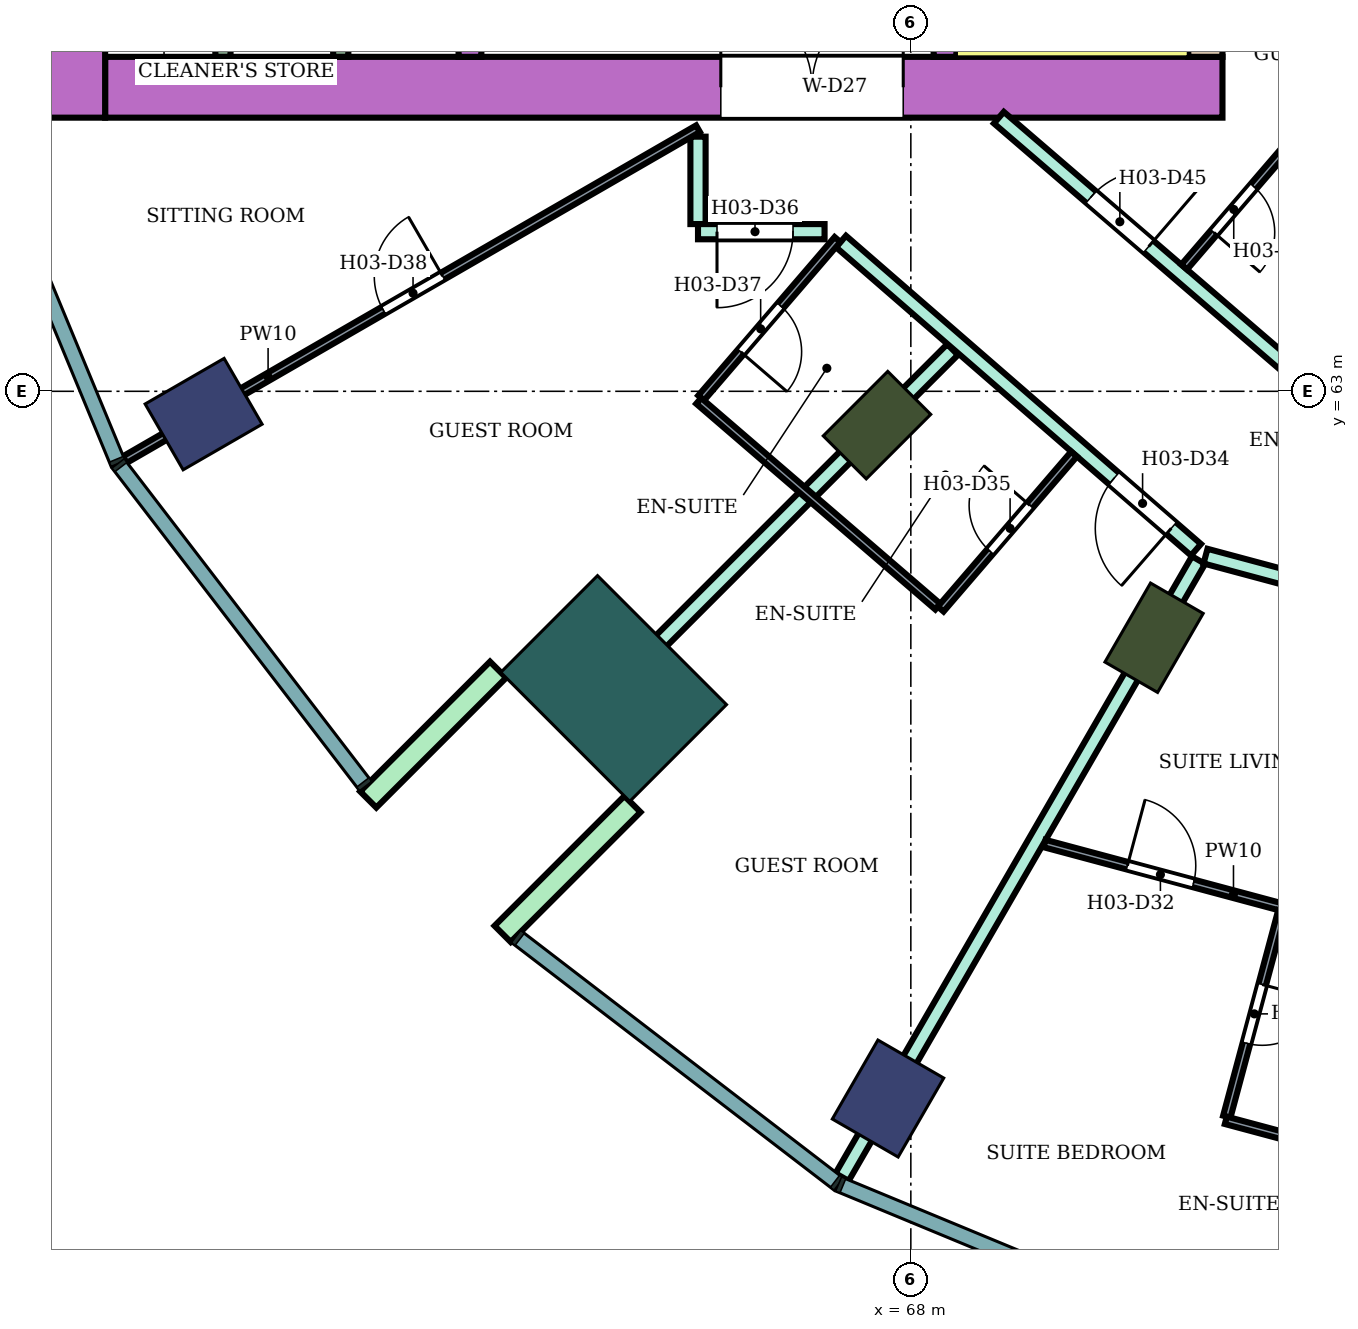
"""IFC4 building model, lengths in metres.
Left out: names, types, materials, properties, quantities, classifications, styles, units other than length and angle.
Written with IfcOpenShell. Run it as: python <this file> out.ifc"""

import sys

from ifc_helpers import new_model, si_unit, direction, frame, frame_2d, origin, origin_2d, place, context, subcontext, project, spatial, rectangle, extrude, element, fill, save


model = new_model("IFC4")
c1 = context("Model", 3, precision=1e-05, world=origin(), true_north=direction((0.0, 1.0)))
c2 = subcontext(c1, "Body", "Model", "MODEL_VIEW")
j1 = project(units=[si_unit("LENGTHUNIT", "METRE"), si_unit("PLANEANGLEUNIT", "RADIAN")], contexts=[c1])
p1 = place(None, origin())
s1 = spatial("IfcSite", under=j1, at=p1, CompositionType="ELEMENT")
p2 = place(p1, origin())
s2 = spatial("IfcBuilding", under=s1, at=p2, CompositionType="ELEMENT")
p3 = place(p2, frame((0.0, 0.0, 51.6)))
s3 = spatial("IfcBuildingStorey", under=s2, at=p3, CompositionType="ELEMENT", Elevation=51.6)
for number, where, z_axis, x_axis in (
    (1, (58.696, 62.7, 0.0), (0.0, 0.0, 1.0), (-0.866, -0.5, 0.0)),
    (2, (67.7, 53.696, 0.0), (0.0, 0.0, 1.0), (-0.5, -0.866, 0.0)),
):
    element("IfcColumn", number, at=place(p3, frame(where, z_axis=z_axis, x_axis=x_axis)), inside=s3, PredefinedType="COLUMN", context=c2, shape_type="SweptSolid", body=[
        extrude(rectangle(XDim=1.2, YDim=1.0, at=origin_2d()), origin(), (0.0, 0.0, 1.0), 3.8),
    ])
for number, where, z_axis, x_axis in (
    (3, (67.555, 62.555, 0.0), (0.0, 0.0, 1.0), (-0.707, -0.707, 0.0)),
    (4, (71.2, 59.758, 0.0), (0.0, 0.0, 1.0), (-0.5, -0.866, 0.0)),
):
    element("IfcColumn", number, at=place(p3, frame(where, z_axis=z_axis, x_axis=x_axis)), inside=s3, PredefinedType="COLUMN", context=c2, shape_type="SweptSolid", body=[
        extrude(rectangle(XDim=1.2, YDim=0.8, at=origin_2d()), origin(), (0.0, 0.0, 1.0), 3.8),
    ])
p4 = place(p3, frame((64.09, 59.09, 0.0), z_axis=(0.0, 0.0, 1.0), x_axis=(-0.707106781187, -0.707106781187, 0.0)))
e5 = element("IfcColumn", 5, at=p4, inside=s3, PredefinedType="COLUMN", context=c2, shape_type="SweptSolid", body=[
    extrude(rectangle(XDim=1.8, YDim=2.4, at=origin_2d()), origin(), (0.0, 0.0, 1.0), 3.8),
])
p5 = place(p3, frame((72.1, 67.0, 0.0), z_axis=(0.0, 0.0, 1.0), x_axis=(-1.0, 0.0, 0.0)))
e6 = element("IfcWall", 6, at=p5, inside=s3, PredefinedType="SHEAR", context=c2, shape_type="SweptSolid", body=[
    extrude(rectangle(XDim=14.7, YDim=0.8, at=frame_2d((7.35, 0.0))), origin(), (0.0, 0.0, 1.0), 3.48),
])
p6 = place(p5, frame((4.2, 0.0, 0.0)))
e7 = element("IfcOpeningElement", 7, at=p6, cuts=e6, PredefinedType="OPENING", context=c2, shape_type="SweptSolid", body=[
    extrude(rectangle(XDim=2.4, YDim=2.4, at=frame_2d((1.2, 1.2))), frame((0.0, 0.41, 0.0), z_axis=(0.0, -1.0, 0.0), x_axis=(1.0, 0.0, 0.0)), (0.0, 0.0, 1.0), 0.82),
])
p7 = place(p3, frame((71.875, 75.0, 0.0), z_axis=(0.0, 0.0, 1.0), x_axis=(0.0, -1.0, 0.0)))
e8 = element("IfcWall", 8, at=p7, inside=s3, PredefinedType="SHEAR", context=c2, shape_type="SweptSolid", body=[
    extrude(rectangle(XDim=7.6, YDim=0.45, at=frame_2d((3.8, 0.0))), origin(), (0.0, 0.0, 1.0), 3.48),
])
p8 = place(p3, frame((57.0, 83.4, 0.0), z_axis=(0.0, 0.0, 1.0), x_axis=(0.0, -1.0, 0.0)))
e9 = element("IfcWall", 9, at=p8, inside=s3, PredefinedType="SHEAR", context=c2, shape_type="SweptSolid", body=[
    extrude(rectangle(XDim=16.8, YDim=0.8, at=frame_2d((8.4, 0.0))), origin(), (0.0, 0.0, 1.0), 3.48),
])
p9 = place(p3, frame((68.45, 75.0, 0.0), z_axis=(0.0, 0.0, 1.0), x_axis=(0.0, -1.0, 0.0)))
e10 = element("IfcWall", 10, at=p9, inside=s3, PredefinedType="SHEAR", context=c2, shape_type="SweptSolid", body=[
    extrude(rectangle(XDim=7.6, YDim=0.3, at=frame_2d((3.8, 0.0))), origin(), (0.0, 0.0, 1.0), 3.48),
])
p10 = place(p9, frame((1.85, 0.0, 0.0)))
e11 = element("IfcOpeningElement", 11, at=p10, cuts=e10, PredefinedType="OPENING", context=c2, shape_type="SweptSolid", body=[
    extrude(rectangle(XDim=0.9, YDim=2.1, at=frame_2d((0.45, 1.05))), frame((0.0, 0.16, 0.0), z_axis=(0.0, -1.0, 0.0), x_axis=(1.0, 0.0, 0.0)), (0.0, 0.0, 1.0), 0.32),
])
p11 = place(p3, frame((62.2, 70.45, 0.0), z_axis=(0.0, 0.0, 1.0), x_axis=(0.0, -1.0, 0.0)))
e12 = element("IfcWall", 12, at=p11, inside=s3, PredefinedType="SHEAR", context=c2, shape_type="SweptSolid", body=[
    extrude(rectangle(XDim=3.05, YDim=0.3, at=frame_2d((1.525, 0.0))), origin(), (0.0, 0.0, 1.0), 3.48),
])
for number, where, z_axis, x_axis in (
    (13, (62.57, 59.338, 0.0), (0.0, 0.0, 1.0), (-0.707, -0.707, 0.0)),
    (14, (64.338, 57.57, 0.0), (0.0, 0.0, 1.0), (-0.707, -0.707, 0.0)),
):
    element("IfcWall", number, at=place(p3, frame(where, z_axis=z_axis, x_axis=x_axis)), inside=s3, PredefinedType="NOTDEFINED", context=c2, shape_type="SweptSolid", body=[
        extrude(rectangle(XDim=2.416, YDim=0.3, at=frame_2d((1.208, 0.0))), origin(), (0.0, 0.0, 1.0), 3.8),
    ])
p12 = place(p3, frame((63.596, 58.596, 0.0), z_axis=(0.0, 0.0, 1.0), x_axis=(0.707106781187, 0.707106781187, 0.0)))
e15 = element("IfcWall", 15, at=p12, inside=s3, PredefinedType="PARTITIONING", context=c2, shape_type="SweptSolid", body=[
    extrude(rectangle(XDim=7.005, YDim=0.2, at=frame_2d((3.503, 0.0))), origin(), (0.0, 0.0, 1.0), 3.35),
])
p13 = place(p3, frame((65.2, 65.2, 0.0), z_axis=(0.0, 0.0, 1.0), x_axis=(0.0, 1.0, 0.0)))
e16 = element("IfcWall", 16, at=p13, inside=s3, PredefinedType="PARTITIONING", context=c2, shape_type="SweptSolid", body=[
    extrude(rectangle(XDim=1.15, YDim=0.2, at=frame_2d((0.575, 0.0))), origin(), (0.0, 0.0, 1.0), 3.35),
])
p14 = place(p3, frame((65.2, 65.1, 0.0), z_axis=(0.0, 0.0, 1.0), x_axis=(1.0, 0.0, 0.0)))
e17 = element("IfcWall", 17, at=p14, inside=s3, PredefinedType="PARTITIONING", context=c2, shape_type="SweptSolid", body=[
    extrude(rectangle(XDim=1.665, YDim=0.2, at=frame_2d((0.833, 0.0))), origin(), (0.0, 0.0, 1.0), 3.35),
])
p15 = place(p14, frame((0.25, 0.0, 0.0)))
e18 = element("IfcOpeningElement", 18, at=p15, cuts=e17, PredefinedType="OPENING", context=c2, shape_type="SweptSolid", body=[
    extrude(rectangle(XDim=1.0, YDim=2.1, at=frame_2d((0.5, 1.05))), frame((0.0, 0.11, 0.0), z_axis=(0.0, -1.0, 0.0), x_axis=(1.0, 0.0, 0.0)), (0.0, 0.0, 1.0), 0.22),
])
p16 = place(p3, frame((67.081, 64.971, 0.0), z_axis=(0.0, 0.0, 1.0), x_axis=(0.755031061605, -0.65568902386, 0.0)))
e19 = element("IfcWall", 19, at=p16, inside=s3, PredefinedType="PARTITIONING", context=c2, shape_type="SweptSolid", body=[
    extrude(rectangle(XDim=6.186, YDim=0.2, at=frame_2d((3.093, 0.0))), origin(), (0.0, 0.0, 1.0), 3.35),
])
p17 = place(p16, frame((4.755, 0.0, 0.0)))
e20 = element("IfcOpeningElement", 20, at=p17, cuts=e19, PredefinedType="OPENING", context=c2, shape_type="SweptSolid", body=[
    extrude(rectangle(XDim=1.0, YDim=2.1, at=frame_2d((0.5, 1.05))), frame((0.0, 0.11, 0.0), z_axis=(0.0, -1.0, 0.0), x_axis=(1.0, 0.0, 0.0)), (0.0, 0.0, 1.0), 0.22),
])
p18 = place(p3, frame((67.095, 52.662, 0.0), z_axis=(0.0, 0.0, 1.0), x_axis=(0.500247659952, 0.865882370021, 0.0)))
e21 = element("IfcWall", 21, at=p18, inside=s3, PredefinedType="PARTITIONING", context=c2, shape_type="SweptSolid", body=[
    extrude(rectangle(XDim=9.375, YDim=0.2, at=frame_2d((4.688, 0.0))), origin(), (0.0, 0.0, 1.0), 3.35),
])
p19 = place(p3, frame((69.158, 66.6, 0.0), z_axis=(0.0, 0.0, 1.0), x_axis=(0.757976058094, -0.652282373943, 0.0)))
e22 = element("IfcWall", 22, at=p19, inside=s3, PredefinedType="PARTITIONING", context=c2, shape_type="SweptSolid", body=[
    extrude(rectangle(XDim=5.16, YDim=0.2, at=frame_2d((2.58, 0.0))), origin(), (0.0, 0.0, 1.0), 3.35),
])
p20 = place(p19, frame((1.6, 0.0, 0.0)))
e23 = element("IfcOpeningElement", 23, at=p20, cuts=e22, PredefinedType="OPENING", context=c2, shape_type="SweptSolid", body=[
    extrude(rectangle(XDim=1.0, YDim=2.1, at=frame_2d((0.5, 1.05))), frame((0.0, 0.11, 0.0), z_axis=(0.0, -1.0, 0.0), x_axis=(1.0, 0.0, 0.0)), (0.0, 0.0, 1.0), 0.22),
])
p21 = place(p3, frame((71.877, 60.831, 0.0), z_axis=(0.0, 0.0, 1.0), x_axis=(0.965852509869, -0.259092510851, 0.0)))
e24 = element("IfcWall", 24, at=p21, inside=s3, PredefinedType="PARTITIONING", context=c2, shape_type="SweptSolid", body=[
    extrude(rectangle(XDim=8.32, YDim=0.2, at=frame_2d((4.16, 0.0))), origin(), (0.0, 0.0, 1.0), 3.35),
])
p22 = place(p21, frame((6.86, 0.0, 0.0)))
e25 = element("IfcOpeningElement", 25, at=p22, cuts=e24, PredefinedType="OPENING", context=c2, shape_type="SweptSolid", body=[
    extrude(rectangle(XDim=1.0, YDim=2.1, at=frame_2d((0.5, 1.05))), frame((0.0, 0.11, 0.0), z_axis=(0.0, -1.0, 0.0), x_axis=(1.0, 0.0, 0.0)), (0.0, 0.0, 1.0), 0.22),
])
p23 = place(p21, frame((1.6, 0.0, 0.0)))
e26 = element("IfcOpeningElement", 26, at=p23, cuts=e24, PredefinedType="OPENING", context=c2, shape_type="SweptSolid", body=[
    extrude(rectangle(XDim=1.0, YDim=2.1, at=frame_2d((0.5, 1.05))), frame((0.0, 0.11, 0.0), z_axis=(0.0, -1.0, 0.0), x_axis=(1.0, 0.0, 0.0)), (0.0, 0.0, 1.0), 0.22),
])
p24 = place(p3, frame((57.659, 62.101, 0.0), z_axis=(0.0, 0.0, 1.0), x_axis=(0.86602264145, 0.500004784474, 0.0)))
e27 = element("IfcWall", 27, at=p24, inside=s3, PredefinedType="PARTITIONING", context=c2, shape_type="SweptSolid", body=[
    extrude(rectangle(XDim=8.708, YDim=0.1, at=frame_2d((4.354, 0.0))), origin(), (0.0, 0.0, 1.0), 3.35),
])
p25 = place(p24, frame((3.929, 0.0, 0.0)))
e28 = element("IfcOpeningElement", 28, at=p25, cuts=e27, PredefinedType="OPENING", context=c2, shape_type="SweptSolid", body=[
    extrude(rectangle(XDim=0.9, YDim=2.1, at=frame_2d((0.45, 1.05))), frame((0.0, 0.06, 0.0), z_axis=(0.0, -1.0, 0.0), x_axis=(1.0, 0.0, 0.0)), (0.0, 0.0, 1.0), 0.12),
])
p26 = place(p3, frame((65.242, 62.912, 0.0), z_axis=(0.0, 0.0, 1.0), x_axis=(0.652069888227, 0.758158862553, 0.0)))
e29 = element("IfcWall", 29, at=p26, inside=s3, PredefinedType="PARTITIONING", context=c2, shape_type="SweptSolid", body=[
    extrude(rectangle(XDim=2.75, YDim=0.1, at=frame_2d((1.375, 0.0))), origin(), (0.0, 0.0, 1.0), 3.35),
])
p27 = place(p26, frame((0.8, 0.0, 0.0)))
e30 = element("IfcOpeningElement", 30, at=p27, cuts=e29, PredefinedType="OPENING", context=c2, shape_type="SweptSolid", body=[
    extrude(rectangle(XDim=0.8, YDim=2.1, at=frame_2d((0.4, 1.05))), frame((0.0, 0.06, 0.0), z_axis=(0.0, -1.0, 0.0), x_axis=(1.0, 0.0, 0.0)), (0.0, 0.0, 1.0), 0.12),
])
p28 = place(p3, frame((65.209, 62.875, 0.0), z_axis=(0.0, 0.0, 1.0), x_axis=(0.757930378138, -0.652335451969, 0.0)))
e31 = element("IfcWall", 31, at=p28, inside=s3, PredefinedType="PARTITIONING", context=c2, shape_type="SweptSolid", body=[
    extrude(rectangle(XDim=4.15, YDim=0.1, at=frame_2d((2.075, 0.0))), origin(), (0.0, 0.0, 1.0), 3.35),
])
p29 = place(p3, frame((68.393, 60.135, 0.0), z_axis=(0.0, 0.0, 1.0), x_axis=(0.652061182569, 0.758166349944, 0.0)))
e32 = element("IfcWall", 32, at=p29, inside=s3, PredefinedType="PARTITIONING", context=c2, shape_type="SweptSolid", body=[
    extrude(rectangle(XDim=2.69, YDim=0.1, at=frame_2d((1.345, 0.0))), origin(), (0.0, 0.0, 1.0), 3.35),
])
p30 = place(p29, frame((1.0, 0.0, 0.0)))
e33 = element("IfcOpeningElement", 33, at=p30, cuts=e32, PredefinedType="OPENING", context=c2, shape_type="SweptSolid", body=[
    extrude(rectangle(XDim=0.8, YDim=2.1, at=frame_2d((0.4, 1.05))), frame((0.0, 0.06, 0.0), z_axis=(0.0, -1.0, 0.0), x_axis=(1.0, 0.0, 0.0)), (0.0, 0.0, 1.0), 0.12),
])
p31 = place(p3, frame((69.76, 57.051, 0.0), z_axis=(0.0, 0.0, 1.0), x_axis=(0.965880475586, -0.258988236958, 0.0)))
e34 = element("IfcWall", 34, at=p31, inside=s3, PredefinedType="PARTITIONING", context=c2, shape_type="SweptSolid", body=[
    extrude(rectangle(XDim=5.146, YDim=0.1, at=frame_2d((2.573, 0.0))), origin(), (0.0, 0.0, 1.0), 3.35),
])
p32 = place(p31, frame((1.128, 0.0, 0.0)))
e35 = element("IfcOpeningElement", 35, at=p32, cuts=e34, PredefinedType="OPENING", context=c2, shape_type="SweptSolid", body=[
    extrude(rectangle(XDim=0.9, YDim=2.1, at=frame_2d((0.45, 1.05))), frame((0.0, 0.06, 0.0), z_axis=(0.0, -1.0, 0.0), x_axis=(1.0, 0.0, 0.0)), (0.0, 0.0, 1.0), 0.12),
])
p33 = place(p3, frame((71.596, 64.635, 0.0), z_axis=(0.0, 0.0, 1.0), x_axis=(0.652285007511, 0.757973791748, 0.0)))
e36 = element("IfcWall", 36, at=p33, inside=s3, PredefinedType="PARTITIONING", context=c2, shape_type="SweptSolid", body=[
    extrude(rectangle(XDim=2.65, YDim=0.1, at=frame_2d((1.325, 0.0))), origin(), (0.0, 0.0, 1.0), 3.35),
])
p34 = place(p33, frame((0.6, 0.0, 0.0)))
e37 = element("IfcOpeningElement", 37, at=p34, cuts=e36, PredefinedType="OPENING", context=c2, shape_type="SweptSolid", body=[
    extrude(rectangle(XDim=0.8, YDim=2.1, at=frame_2d((0.4, 1.05))), frame((0.0, 0.06, 0.0), z_axis=(0.0, -1.0, 0.0), x_axis=(1.0, 0.0, 0.0)), (0.0, 0.0, 1.0), 0.12),
])
p35 = place(p3, frame((72.157, 53.457, 0.0), z_axis=(0.0, 0.0, 1.0), x_axis=(0.258975798317, 0.965883810759, 0.0)))
e38 = element("IfcWall", 38, at=p35, inside=s3, PredefinedType="PARTITIONING", context=c2, shape_type="SweptSolid", body=[
    extrude(rectangle(XDim=2.8, YDim=0.1, at=frame_2d((1.4, 0.0))), origin(), (0.0, 0.0, 1.0), 3.35),
])
p36 = place(p35, frame((1.0, 0.0, 0.0)))
e39 = element("IfcOpeningElement", 39, at=p36, cuts=e38, PredefinedType="OPENING", context=c2, shape_type="SweptSolid", body=[
    extrude(rectangle(XDim=0.8, YDim=2.1, at=frame_2d((0.4, 1.05))), frame((0.0, 0.06, 0.0), z_axis=(0.0, -1.0, 0.0), x_axis=(1.0, 0.0, 0.0)), (0.0, 0.0, 1.0), 0.12),
])
p37 = place(p3, frame((72.144, 53.409, 0.0), z_axis=(0.0, 0.0, 1.0), x_axis=(0.965907902023, -0.258885930111, 0.0)))
e40 = element("IfcWall", 40, at=p37, inside=s3, PredefinedType="PARTITIONING", context=c2, shape_type="SweptSolid", body=[
    extrude(rectangle(XDim=1.9, YDim=0.1, at=frame_2d((0.95, 0.0))), origin(), (0.0, 0.0, 1.0), 3.35),
])
for number, where, z_axis, x_axis in (
    (41, (60.5, 70.15, 0.0), (0.0, 0.0, 1.0), (0.0, -1.0, 0.0)),
    (42, (58.95, 70.15, 0.0), (0.0, 0.0, 1.0), (0.0, -1.0, 0.0)),
):
    element("IfcWall", number, at=place(p3, frame(where, z_axis=z_axis, x_axis=x_axis)), inside=s3, PredefinedType="PARTITIONING", context=c2, shape_type="SweptSolid", body=[
        extrude(rectangle(XDim=2.75, YDim=0.2, at=frame_2d((1.375, 0.0))), origin(), (0.0, 0.0, 1.0), 3.48),
    ])
p38 = place(p32, origin())
e43 = element("IfcDoor", 43, at=p38, inside=s3, OperationType="SINGLE_SWING_LEFT", PredefinedType="DOOR", context=c2, shape_type="SweptSolid", body=[
    extrude(rectangle(XDim=0.9, YDim=2.1, at=frame_2d((0.45, 1.05))), frame((0.0, 0.025, 0.0), z_axis=(0.0, -1.0, 0.0), x_axis=(1.0, 0.0, 0.0)), (0.0, 0.0, 1.0), 0.05),
])
fill(e35, e43)
p39 = place(p36, frame((0.8, 0.0, 0.0), z_axis=(0.0, 0.0, 1.0), x_axis=(-1.0, 0.0, 0.0)))
e44 = element("IfcDoor", 44, at=p39, inside=s3, OperationType="SINGLE_SWING_LEFT", PredefinedType="DOOR", context=c2, shape_type="SweptSolid", body=[
    extrude(rectangle(XDim=0.8, YDim=2.1, at=frame_2d((0.4, 1.05))), frame((0.0, 0.025, 0.0), z_axis=(0.0, -1.0, 0.0), x_axis=(1.0, 0.0, 0.0)), (0.0, 0.0, 1.0), 0.05),
])
fill(e39, e44)
p40 = place(p17, frame((1.0, 0.0, 0.0), z_axis=(0.0, 0.0, 1.0), x_axis=(-1.0, 0.0, 0.0)))
e45 = element("IfcDoor", 45, at=p40, inside=s3, OperationType="SINGLE_SWING_LEFT", PredefinedType="DOOR", context=c2, shape_type="SweptSolid", body=[
    extrude(rectangle(XDim=1.0, YDim=2.1, at=frame_2d((0.5, 1.05))), frame((0.0, 0.025, 0.0), z_axis=(0.0, -1.0, 0.0), x_axis=(1.0, 0.0, 0.0)), (0.0, 0.0, 1.0), 0.05),
])
fill(e20, e45)
p41 = place(p30, origin())
e46 = element("IfcDoor", 46, at=p41, inside=s3, OperationType="SINGLE_SWING_RIGHT", PredefinedType="DOOR", context=c2, shape_type="SweptSolid", body=[
    extrude(rectangle(XDim=0.8, YDim=2.1, at=frame_2d((0.4, 1.05))), frame((0.0, 0.025, 0.0), z_axis=(0.0, -1.0, 0.0), x_axis=(1.0, 0.0, 0.0)), (0.0, 0.0, 1.0), 0.05),
])
fill(e33, e46)
p42 = place(p15, frame((1.0, 0.0, 0.0), z_axis=(0.0, 0.0, 1.0), x_axis=(-1.0, 0.0, 0.0)))
e47 = element("IfcDoor", 47, at=p42, inside=s3, OperationType="SINGLE_SWING_RIGHT", PredefinedType="DOOR", context=c2, shape_type="SweptSolid", body=[
    extrude(rectangle(XDim=1.0, YDim=2.1, at=frame_2d((0.5, 1.05))), frame((0.0, 0.025, 0.0), z_axis=(0.0, -1.0, 0.0), x_axis=(1.0, 0.0, 0.0)), (0.0, 0.0, 1.0), 0.05),
])
fill(e18, e47)
p43 = place(p27, frame((0.8, 0.0, 0.0), z_axis=(0.0, 0.0, 1.0), x_axis=(-1.0, 0.0, 0.0)))
e48 = element("IfcDoor", 48, at=p43, inside=s3, OperationType="SINGLE_SWING_RIGHT", PredefinedType="DOOR", context=c2, shape_type="SweptSolid", body=[
    extrude(rectangle(XDim=0.8, YDim=2.1, at=frame_2d((0.4, 1.05))), frame((0.0, 0.025, 0.0), z_axis=(0.0, -1.0, 0.0), x_axis=(1.0, 0.0, 0.0)), (0.0, 0.0, 1.0), 0.05),
])
fill(e30, e48)
p44 = place(p25, origin())
e49 = element("IfcDoor", 49, at=p44, inside=s3, OperationType="SINGLE_SWING_RIGHT", PredefinedType="DOOR", context=c2, shape_type="SweptSolid", body=[
    extrude(rectangle(XDim=0.9, YDim=2.1, at=frame_2d((0.45, 1.05))), frame((0.0, 0.025, 0.0), z_axis=(0.0, -1.0, 0.0), x_axis=(1.0, 0.0, 0.0)), (0.0, 0.0, 1.0), 0.05),
])
fill(e28, e49)
p45 = place(p20, origin())
e50 = element("IfcDoor", 50, at=p45, inside=s3, OperationType="SINGLE_SWING_RIGHT", PredefinedType="DOOR", context=c2, shape_type="SweptSolid", body=[
    extrude(rectangle(XDim=1.0, YDim=2.1, at=frame_2d((0.5, 1.05))), frame((0.0, 0.025, 0.0), z_axis=(0.0, -1.0, 0.0), x_axis=(1.0, 0.0, 0.0)), (0.0, 0.0, 1.0), 0.05),
])
fill(e23, e50)
p46 = place(p34, frame((0.8, 0.0, 0.0), z_axis=(0.0, 0.0, 1.0), x_axis=(-1.0, 0.0, 0.0)))
e51 = element("IfcDoor", 51, at=p46, inside=s3, OperationType="SINGLE_SWING_RIGHT", PredefinedType="DOOR", context=c2, shape_type="SweptSolid", body=[
    extrude(rectangle(XDim=0.8, YDim=2.1, at=frame_2d((0.4, 1.05))), frame((0.0, 0.025, 0.0), z_axis=(0.0, -1.0, 0.0), x_axis=(1.0, 0.0, 0.0)), (0.0, 0.0, 1.0), 0.05),
])
fill(e37, e51)
p47 = place(p6, frame((2.4, 0.0, 0.0), z_axis=(0.0, 0.0, 1.0), x_axis=(-1.0, 0.0, 0.0)))
e52 = element("IfcDoor", 52, at=p47, inside=s3, OperationType="DOUBLE_DOOR_SINGLE_SWING", PredefinedType="DOOR", context=c2, shape_type="SweptSolid", body=[
    extrude(rectangle(XDim=2.4, YDim=2.4, at=frame_2d((1.2, 1.2))), frame((0.0, 0.025, 0.0), z_axis=(0.0, -1.0, 0.0), x_axis=(1.0, 0.0, 0.0)), (0.0, 0.0, 1.0), 0.05),
])
fill(e7, e52)
save(model, sys.argv[1])
